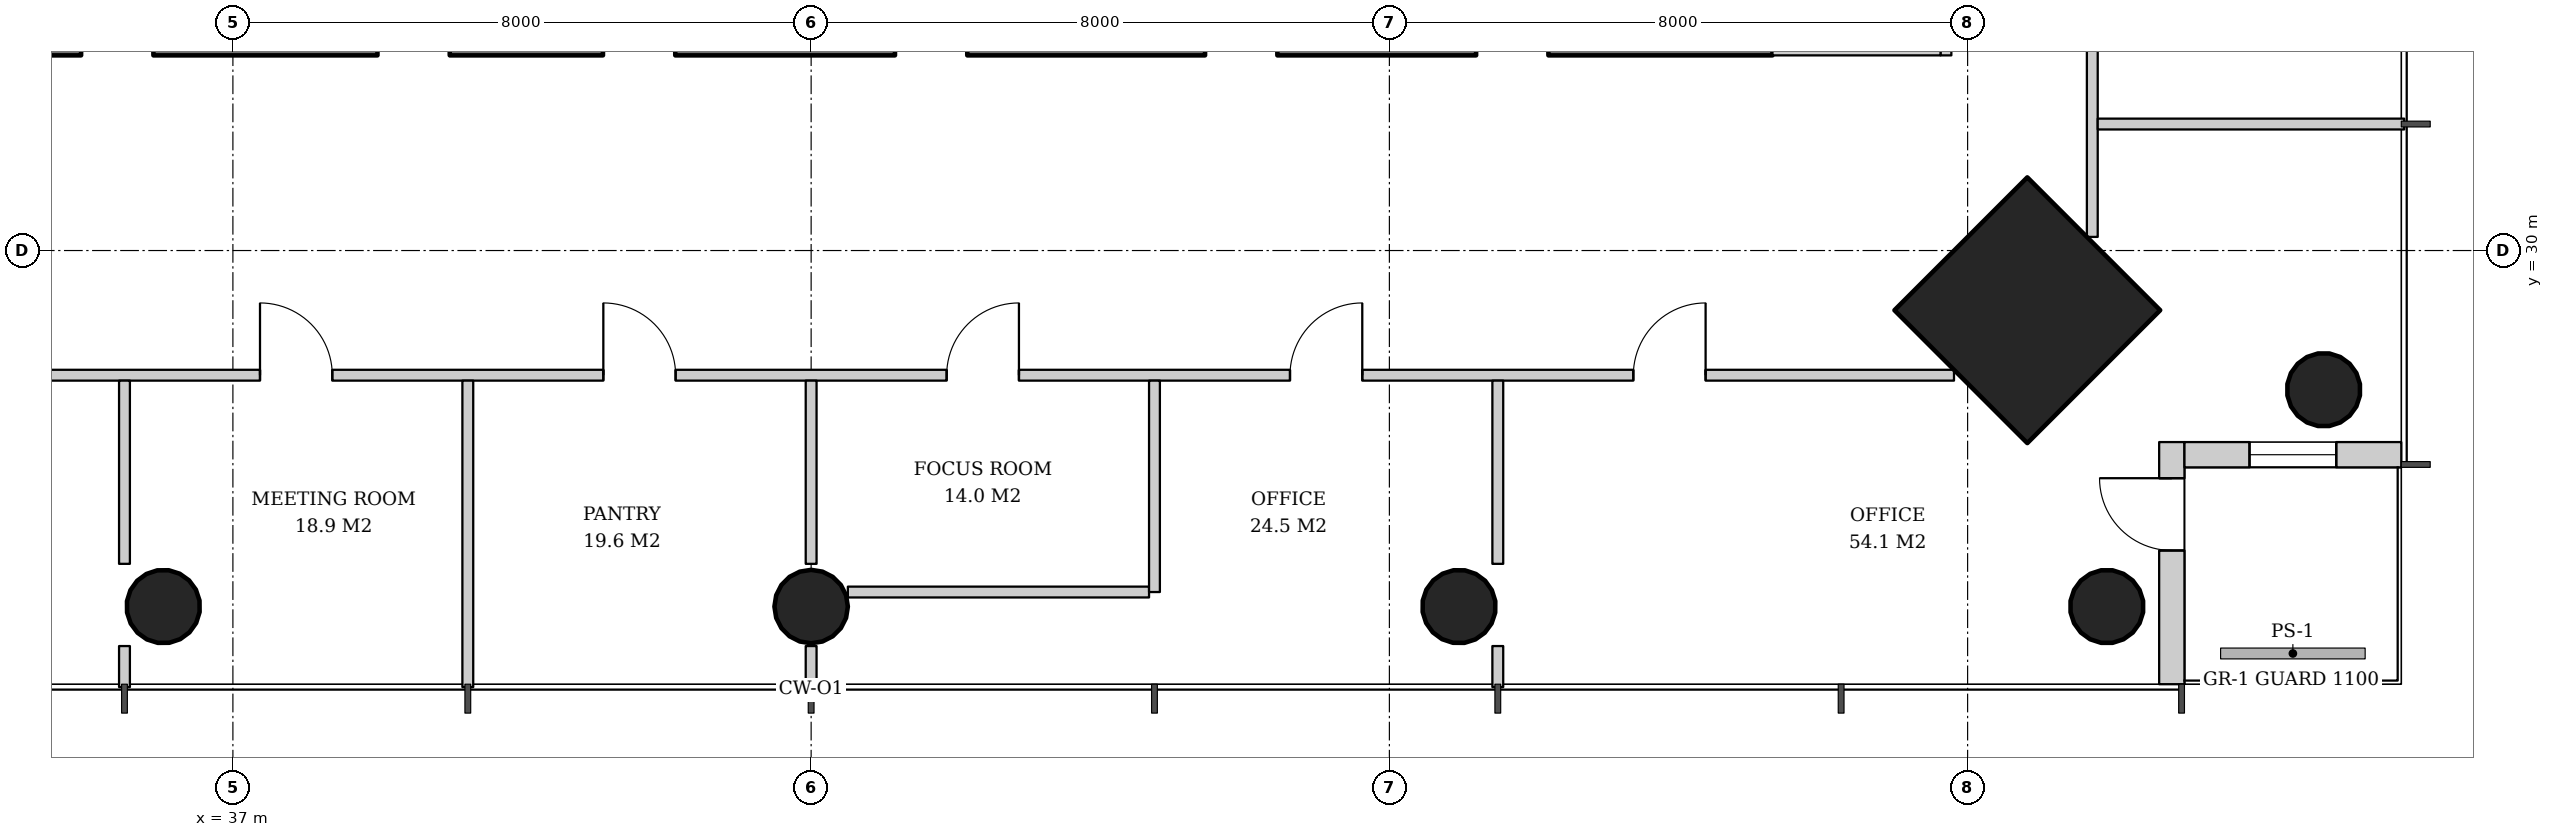
"""IFC4 building model, lengths in metres.
Left out: names, types, materials, properties, quantities, classifications, styles, units other than length and angle.
Written with IfcOpenShell. Run it as: python <this file> out.ifc"""

import sys

from ifc_helpers import new_model, si_unit, direction, frame, frame_2d, origin, origin_2d, place, context, subcontext, project, spatial, rectangle, hollow_circle, extrude, element, fill, save


model = new_model("IFC4")
c1 = context("Model", 3, precision=1e-05, world=origin(), true_north=direction((0.0, 1.0)))
c2 = subcontext(c1, "Body", "Model", "MODEL_VIEW")
j1 = project(units=[si_unit("LENGTHUNIT", "METRE"), si_unit("PLANEANGLEUNIT", "RADIAN")], contexts=[c1])
p1 = place(None, origin())
s1 = spatial("IfcSite", under=j1, at=p1, CompositionType="ELEMENT")
p2 = place(p1, origin())
s2 = spatial("IfcBuilding", under=s1, at=p2, CompositionType="ELEMENT")
p3 = place(p2, frame((0.0, 0.0, 116.0)))
s3 = spatial("IfcBuildingStorey", under=s2, at=p3, CompositionType="ELEMENT", Elevation=116.0)
p4 = place(p3, frame((65.964, 28.036, 0.0), z_axis=(-0.031962158256, 0.031962158256, 0.998977898093), x_axis=(-0.707106781187, -0.707106781187, 0.0)))
e1 = element("IfcColumn", 1, at=p4, inside=s3, PredefinedType="COLUMN", context=c2, shape_type="SweptSolid", body=[
    extrude(hollow_circle(Radius=0.508, WallThickness=0.04, at=origin_2d()), origin(), (0.0, 0.0, 1.0), 3.804),
])
p5 = place(p3, frame((61.864, 29.136, 0.0), z_axis=(-0.031898107953, 0.031898107953, 0.998981992539), x_axis=(-0.707106781187, -0.707106781187, 0.0)))
e2 = element("IfcColumn", 2, at=p5, inside=s3, PredefinedType="COLUMN", context=c2, shape_type="SweptSolid", body=[
    extrude(rectangle(XDim=2.6, YDim=2.6, at=origin_2d()), origin(), (0.0, 0.0, 1.0), 3.804),
])
p6 = place(p3, frame((62.964, 25.036, 0.0), z_axis=(-0.031962158256, 0.031962158256, 0.998977898093), x_axis=(-0.707106781187, -0.707106781187, 0.0)))
e3 = element("IfcColumn", 3, at=p6, inside=s3, PredefinedType="COLUMN", context=c2, shape_type="SweptSolid", body=[
    extrude(hollow_circle(Radius=0.508, WallThickness=0.04, at=origin_2d()), origin(), (0.0, 0.0, 1.0), 3.804),
])
p7 = place(p3, frame((36.018, 25.036, 0.0), z_axis=(0.015987204877, 0.031974409754, 0.999360818924), x_axis=(-0.894427191, 0.4472135955, 0.0)))
e4 = element("IfcColumn", 4, at=p7, inside=s3, PredefinedType="COLUMN", context=c2, shape_type="SweptSolid", body=[
    extrude(hollow_circle(Radius=0.508, WallThickness=0.04, at=origin_2d()), origin(), (0.0, 0.0, 1.0), 3.802),
])
p8 = place(p3, frame((45.0, 25.036, 0.0), z_axis=(0.0, 0.031978496719, 0.999488557087), x_axis=(-1.0, 0.0, 0.0)))
e5 = element("IfcColumn", 5, at=p8, inside=s3, PredefinedType="COLUMN", context=c2, shape_type="SweptSolid", body=[
    extrude(hollow_circle(Radius=0.508, WallThickness=0.04, at=origin_2d()), origin(), (0.0, 0.0, 1.0), 3.802),
])
p9 = place(p3, frame((53.982, 25.036, 0.0), z_axis=(-0.015987204877, 0.031974409754, 0.999360818924), x_axis=(-0.894427191, -0.4472135955, 0.0)))
e6 = element("IfcColumn", 6, at=p9, inside=s3, PredefinedType="COLUMN", context=c2, shape_type="SweptSolid", body=[
    extrude(hollow_circle(Radius=0.508, WallThickness=0.04, at=origin_2d()), origin(), (0.0, 0.0, 1.0), 3.802),
])
p10 = place(p3, frame((31.7, 33.05, 0.0), z_axis=(0.0, 0.0, 1.0), x_axis=(1.0, 0.0, 0.0)))
e7 = element("IfcWall", 7, at=p10, inside=s3, PredefinedType="SHEAR", context=c2, shape_type="SweptSolid", body=[
    extrude(rectangle(XDim=26.6, YDim=0.7, at=frame_2d((13.3, 0.0))), origin(), (0.0, 0.0, 1.0), 3.8),
])
p11 = place(p10, frame((7.3, 0.0, 0.0)))
e8 = element("IfcOpeningElement", 8, at=p11, cuts=e7, PredefinedType="OPENING", context=c2, shape_type="SweptSolid", body=[
    extrude(rectangle(XDim=1.0, YDim=2.1, at=frame_2d((0.5, 1.05))), frame((0.0, 0.36, 0.0), z_axis=(0.0, -1.0, 0.0), x_axis=(1.0, 0.0, 0.0)), (0.0, 0.0, 1.0), 0.72),
])
p12 = place(p10, frame((18.75, 0.0, 0.0)))
e9 = element("IfcOpeningElement", 9, at=p12, cuts=e7, PredefinedType="OPENING", context=c2, shape_type="SweptSolid", body=[
    extrude(rectangle(XDim=1.0, YDim=2.1, at=frame_2d((0.5, 1.05))), frame((0.0, 0.36, 0.0), z_axis=(0.0, -1.0, 0.0), x_axis=(1.0, 0.0, 0.0)), (0.0, 0.0, 1.0), 0.72),
])
p13 = place(p10, frame((3.2, 0.0, 0.0)))
e10 = element("IfcOpeningElement", 10, at=p13, cuts=e7, PredefinedType="OPENING", context=c2, shape_type="SweptSolid", body=[
    extrude(rectangle(XDim=1.0, YDim=2.1, at=frame_2d((0.5, 1.05))), frame((0.0, 0.36, 0.0), z_axis=(0.0, -1.0, 0.0), x_axis=(1.0, 0.0, 0.0)), (0.0, 0.0, 1.0), 0.72),
])
p14 = place(p10, frame((10.42, 0.0, 0.0)))
e11 = element("IfcOpeningElement", 11, at=p14, cuts=e7, PredefinedType="OPENING", context=c2, shape_type="SweptSolid", body=[
    extrude(rectangle(XDim=1.0, YDim=2.1, at=frame_2d((0.5, 1.05))), frame((0.0, 0.36, 0.0), z_axis=(0.0, -1.0, 0.0), x_axis=(1.0, 0.0, 0.0)), (0.0, 0.0, 1.0), 0.72),
])
p15 = place(p10, frame((14.46, 0.0, 0.0)))
e12 = element("IfcOpeningElement", 12, at=p15, cuts=e7, PredefinedType="OPENING", context=c2, shape_type="SweptSolid", body=[
    extrude(rectangle(XDim=1.0, YDim=2.1, at=frame_2d((0.5, 1.05))), frame((0.0, 0.36, 0.0), z_axis=(0.0, -1.0, 0.0), x_axis=(1.0, 0.0, 0.0)), (0.0, 0.0, 1.0), 0.72),
])
p16 = place(p10, frame((22.5, 0.0, 0.0)))
e13 = element("IfcOpeningElement", 13, at=p16, cuts=e7, PredefinedType="OPENING", context=c2, shape_type="SweptSolid", body=[
    extrude(rectangle(XDim=1.0, YDim=2.1, at=frame_2d((0.5, 1.05))), frame((0.0, 0.36, 0.0), z_axis=(0.0, -1.0, 0.0), x_axis=(1.0, 0.0, 0.0)), (0.0, 0.0, 1.0), 0.72),
])
p17 = place(p3, frame((63.825, 24.0, 0.0), z_axis=(0.0, 0.0, 1.0), x_axis=(0.0, 1.0, 0.0)))
e14 = element("IfcWall", 14, at=p17, inside=s3, PredefinedType="SOLIDWALL", context=c2, shape_type="SweptSolid", body=[
    extrude(rectangle(XDim=3.35, YDim=0.35, at=frame_2d((1.675, 0.0))), origin(), (0.0, 0.0, 1.0), 3.62),
])
p18 = place(p17, frame((1.85, 0.0, 0.0)))
e15 = element("IfcOpeningElement", 15, at=p18, cuts=e14, PredefinedType="OPENING", context=c2, shape_type="SweptSolid", body=[
    extrude(rectangle(XDim=1.0, YDim=2.4, at=frame_2d((0.5, 1.2))), frame((0.0, 0.185, 0.0), z_axis=(0.0, -1.0, 0.0), x_axis=(1.0, 0.0, 0.0)), (0.0, 0.0, 1.0), 0.37),
])
p19 = place(p3, frame((64.0, 27.175, 0.0), z_axis=(0.0, 0.0, 1.0), x_axis=(1.0, 0.0, 0.0)))
e16 = element("IfcWall", 16, at=p19, inside=s3, PredefinedType="SOLIDWALL", context=c2, shape_type="SweptSolid", body=[
    extrude(rectangle(XDim=3.0, YDim=0.35, at=frame_2d((1.5, 0.0))), origin(), (0.0, 0.0, 1.0), 3.62),
])
p20 = place(p19, frame((0.9, 0.0, 0.6)))
e17 = element("IfcOpeningElement", 17, at=p20, cuts=e16, PredefinedType="OPENING", context=c2, shape_type="SweptSolid", body=[
    extrude(rectangle(XDim=1.2, YDim=2.55, at=frame_2d((0.6, 1.275))), frame((0.0, 0.185, 0.0), z_axis=(0.0, -1.0, 0.0), x_axis=(1.0, 0.0, 0.0)), (0.0, 0.0, 1.0), 0.37),
])
p21 = place(p3, frame((60.7, 32.7, 0.0), z_axis=(0.0, 0.0, 1.0), x_axis=(0.0, 1.0, 0.0)))
e18 = element("IfcWall", 18, at=p21, inside=s3, PredefinedType="PARTITIONING", context=c2, shape_type="SweptSolid", body=[
    extrude(rectangle(XDim=11.275, YDim=0.15, at=frame_2d((5.638, 0.0))), origin(), (0.0, 0.0, 1.0), 2.72),
])
p22 = place(p21, frame((5.137, 0.0, 0.0)))
e19 = element("IfcOpeningElement", 19, at=p22, cuts=e18, PredefinedType="OPENING", context=c2, shape_type="SweptSolid", body=[
    extrude(rectangle(XDim=1.0, YDim=2.1, at=frame_2d((0.5, 1.05))), frame((0.0, 0.085, 0.0), z_axis=(0.0, -1.0, 0.0), x_axis=(1.0, 0.0, 0.0)), (0.0, 0.0, 1.0), 0.17),
])
p23 = place(p3, frame((58.3, 32.775, 0.0), z_axis=(0.0, 0.0, 1.0), x_axis=(1.0, 0.0, 0.0)))
e20 = element("IfcWall", 20, at=p23, inside=s3, PredefinedType="PARTITIONING", context=c2, shape_type="SweptSolid", body=[
    extrude(rectangle(XDim=2.325, YDim=0.15, at=frame_2d((1.163, 0.0))), origin(), (0.0, 0.0, 1.0), 3.62),
])
p24 = place(p3, frame((62.725, 30.188, 0.0), z_axis=(0.0, 0.0, 1.0), x_axis=(0.0, 1.0, 0.0)))
e21 = element("IfcWall", 21, at=p24, inside=s3, PredefinedType="PARTITIONING", context=c2, shape_type="SweptSolid", body=[
    extrude(rectangle(XDim=31.623, YDim=0.15, at=frame_2d((15.812, 0.0))), origin(), (0.0, 0.0, 1.0), 2.72),
])
p25 = place(p24, frame((3.437, 0.0, 0.0)))
e22 = element("IfcOpeningElement", 22, at=p25, cuts=e21, PredefinedType="OPENING", context=c2, shape_type="SweptSolid", body=[
    extrude(rectangle(XDim=1.0, YDim=2.1, at=frame_2d((0.5, 1.05))), frame((0.0, 0.085, 0.0), z_axis=(0.0, -1.0, 0.0), x_axis=(1.0, 0.0, 0.0)), (0.0, 0.0, 1.0), 0.17),
])
p26 = place(p24, frame((8.187, 0.0, 0.0)))
e23 = element("IfcOpeningElement", 23, at=p26, cuts=e21, PredefinedType="OPENING", context=c2, shape_type="SweptSolid", body=[
    extrude(rectangle(XDim=1.0, YDim=2.1, at=frame_2d((0.5, 1.05))), frame((0.0, 0.085, 0.0), z_axis=(0.0, -1.0, 0.0), x_axis=(1.0, 0.0, 0.0)), (0.0, 0.0, 1.0), 0.17),
])
p27 = place(p24, frame((12.937, 0.0, 0.0)))
e24 = element("IfcOpeningElement", 24, at=p27, cuts=e21, PredefinedType="OPENING", context=c2, shape_type="SweptSolid", body=[
    extrude(rectangle(XDim=1.0, YDim=2.1, at=frame_2d((0.5, 1.05))), frame((0.0, 0.085, 0.0), z_axis=(0.0, -1.0, 0.0), x_axis=(1.0, 0.0, 0.0)), (0.0, 0.0, 1.0), 0.17),
])
p28 = place(p24, frame((17.687, 0.0, 0.0)))
e25 = element("IfcOpeningElement", 25, at=p28, cuts=e21, PredefinedType="OPENING", context=c2, shape_type="SweptSolid", body=[
    extrude(rectangle(XDim=1.0, YDim=2.1, at=frame_2d((0.5, 1.05))), frame((0.0, 0.085, 0.0), z_axis=(0.0, -1.0, 0.0), x_axis=(1.0, 0.0, 0.0)), (0.0, 0.0, 1.0), 0.17),
])
p29 = place(p24, frame((22.437, 0.0, 0.0)))
e26 = element("IfcOpeningElement", 26, at=p29, cuts=e21, PredefinedType="OPENING", context=c2, shape_type="SweptSolid", body=[
    extrude(rectangle(XDim=1.0, YDim=2.1, at=frame_2d((0.5, 1.05))), frame((0.0, 0.085, 0.0), z_axis=(0.0, -1.0, 0.0), x_axis=(1.0, 0.0, 0.0)), (0.0, 0.0, 1.0), 0.17),
])
p30 = place(p24, frame((27.187, 0.0, 0.0)))
e27 = element("IfcOpeningElement", 27, at=p30, cuts=e21, PredefinedType="OPENING", context=c2, shape_type="SweptSolid", body=[
    extrude(rectangle(XDim=1.0, YDim=2.1, at=frame_2d((0.5, 1.05))), frame((0.0, 0.085, 0.0), z_axis=(0.0, -1.0, 0.0), x_axis=(1.0, 0.0, 0.0)), (0.0, 0.0, 1.0), 0.17),
])
p31 = place(p3, frame((62.8, 31.75, 0.0), z_axis=(0.0, 0.0, 1.0), x_axis=(1.0, 0.0, 0.0)))
e28 = element("IfcWall", 28, at=p31, inside=s3, PredefinedType="PARTITIONING", context=c2, shape_type="SweptSolid", body=[
    extrude(rectangle(XDim=4.24, YDim=0.15, at=frame_2d((2.12, 0.0))), origin(), (0.0, 0.0, 1.0), 2.82),
])
p32 = place(p3, frame((45.508, 25.275, 0.0), z_axis=(0.0, 0.0, 1.0), x_axis=(1.0, 0.0, 0.0)))
e29 = element("IfcWall", 29, at=p32, inside=s3, PredefinedType="PARTITIONING", context=c2, shape_type="SweptSolid", body=[
    extrude(rectangle(XDim=4.167, YDim=0.15, at=frame_2d((2.083, 0.0))), origin(), (0.0, 0.0, 1.0), 2.82),
])
p33 = place(p3, frame((29.188, 28.275, 0.0), z_axis=(0.0, 0.0, 1.0), x_axis=(1.0, 0.0, 0.0)))
e30 = element("IfcWall", 30, at=p33, inside=s3, PredefinedType="PARTITIONING", context=c2, shape_type="SweptSolid", body=[
    extrude(rectangle(XDim=31.623, YDim=0.15, at=frame_2d((15.812, 0.0))), origin(), (0.0, 0.0, 1.0), 2.72),
])
p34 = place(p33, frame((3.437, 0.0, 0.0)))
e31 = element("IfcOpeningElement", 31, at=p34, cuts=e30, PredefinedType="OPENING", context=c2, shape_type="SweptSolid", body=[
    extrude(rectangle(XDim=1.0, YDim=2.1, at=frame_2d((0.5, 1.05))), frame((0.0, 0.085, 0.0), z_axis=(0.0, -1.0, 0.0), x_axis=(1.0, 0.0, 0.0)), (0.0, 0.0, 1.0), 0.17),
])
p35 = place(p33, frame((8.187, 0.0, 0.0)))
e32 = element("IfcOpeningElement", 32, at=p35, cuts=e30, PredefinedType="OPENING", context=c2, shape_type="SweptSolid", body=[
    extrude(rectangle(XDim=1.0, YDim=2.1, at=frame_2d((0.5, 1.05))), frame((0.0, 0.085, 0.0), z_axis=(0.0, -1.0, 0.0), x_axis=(1.0, 0.0, 0.0)), (0.0, 0.0, 1.0), 0.17),
])
p36 = place(p33, frame((12.937, 0.0, 0.0)))
e33 = element("IfcOpeningElement", 33, at=p36, cuts=e30, PredefinedType="OPENING", context=c2, shape_type="SweptSolid", body=[
    extrude(rectangle(XDim=1.0, YDim=2.1, at=frame_2d((0.5, 1.05))), frame((0.0, 0.085, 0.0), z_axis=(0.0, -1.0, 0.0), x_axis=(1.0, 0.0, 0.0)), (0.0, 0.0, 1.0), 0.17),
])
p37 = place(p33, frame((17.687, 0.0, 0.0)))
e34 = element("IfcOpeningElement", 34, at=p37, cuts=e30, PredefinedType="OPENING", context=c2, shape_type="SweptSolid", body=[
    extrude(rectangle(XDim=1.0, YDim=2.1, at=frame_2d((0.5, 1.05))), frame((0.0, 0.085, 0.0), z_axis=(0.0, -1.0, 0.0), x_axis=(1.0, 0.0, 0.0)), (0.0, 0.0, 1.0), 0.17),
])
p38 = place(p33, frame((22.437, 0.0, 0.0)))
e35 = element("IfcOpeningElement", 35, at=p38, cuts=e30, PredefinedType="OPENING", context=c2, shape_type="SweptSolid", body=[
    extrude(rectangle(XDim=1.0, YDim=2.1, at=frame_2d((0.5, 1.05))), frame((0.0, 0.085, 0.0), z_axis=(0.0, -1.0, 0.0), x_axis=(1.0, 0.0, 0.0)), (0.0, 0.0, 1.0), 0.17),
])
p39 = place(p33, frame((27.187, 0.0, 0.0)))
e36 = element("IfcOpeningElement", 36, at=p39, cuts=e30, PredefinedType="OPENING", context=c2, shape_type="SweptSolid", body=[
    extrude(rectangle(XDim=1.0, YDim=2.1, at=frame_2d((0.5, 1.05))), frame((0.0, 0.085, 0.0), z_axis=(0.0, -1.0, 0.0), x_axis=(1.0, 0.0, 0.0)), (0.0, 0.0, 1.0), 0.17),
])
p40 = place(p3, frame((35.5, 28.2, 0.0), z_axis=(0.0, 0.0, 1.0), x_axis=(0.0, -1.0, 0.0)))
e37 = element("IfcWall", 37, at=p40, inside=s3, PredefinedType="PARTITIONING", context=c2, shape_type="SweptSolid", body=[
    extrude(rectangle(XDim=2.535, YDim=0.15, at=frame_2d((1.268, 0.0))), origin(), (0.0, 0.0, 1.0), 3.62),
])
p41 = place(p3, frame((35.5, 24.528, 0.0), z_axis=(0.0, 0.0, 1.0), x_axis=(0.0, -1.0, 0.0)))
e38 = element("IfcWall", 38, at=p41, inside=s3, PredefinedType="PARTITIONING", context=c2, shape_type="SweptSolid", body=[
    extrude(rectangle(XDim=0.568, YDim=0.15, at=frame_2d((0.284, 0.0))), origin(), (0.0, 0.0, 1.0), 3.62),
])
p42 = place(p3, frame((40.25, 28.2, 0.0), z_axis=(0.0, 0.0, 1.0), x_axis=(0.0, -1.0, 0.0)))
e39 = element("IfcWall", 39, at=p42, inside=s3, PredefinedType="PARTITIONING", context=c2, shape_type="SweptSolid", body=[
    extrude(rectangle(XDim=4.24, YDim=0.15, at=frame_2d((2.12, 0.0))), origin(), (0.0, 0.0, 1.0), 2.82),
])
p43 = place(p3, frame((45.0, 28.2, 0.0), z_axis=(0.0, 0.0, 1.0), x_axis=(0.0, -1.0, 0.0)))
e40 = element("IfcWall", 40, at=p43, inside=s3, PredefinedType="PARTITIONING", context=c2, shape_type="SweptSolid", body=[
    extrude(rectangle(XDim=2.535, YDim=0.15, at=frame_2d((1.268, 0.0))), origin(), (0.0, 0.0, 1.0), 3.62),
])
p44 = place(p3, frame((45.0, 24.528, 0.0), z_axis=(0.0, 0.0, 1.0), x_axis=(0.0, -1.0, 0.0)))
e41 = element("IfcWall", 41, at=p44, inside=s3, PredefinedType="PARTITIONING", context=c2, shape_type="SweptSolid", body=[
    extrude(rectangle(XDim=0.568, YDim=0.15, at=frame_2d((0.284, 0.0))), origin(), (0.0, 0.0, 1.0), 3.62),
])
p45 = place(p3, frame((49.75, 28.2, 0.0), z_axis=(0.0, 0.0, 1.0), x_axis=(0.0, -1.0, 0.0)))
e42 = element("IfcWall", 42, at=p45, inside=s3, PredefinedType="PARTITIONING", context=c2, shape_type="SweptSolid", body=[
    extrude(rectangle(XDim=2.925, YDim=0.15, at=frame_2d((1.462, 0.0))), origin(), (0.0, 0.0, 1.0), 2.82),
])
p46 = place(p3, frame((54.5, 28.2, 0.0), z_axis=(0.0, 0.0, 1.0), x_axis=(0.0, -1.0, 0.0)))
e43 = element("IfcWall", 43, at=p46, inside=s3, PredefinedType="PARTITIONING", context=c2, shape_type="SweptSolid", body=[
    extrude(rectangle(XDim=2.535, YDim=0.15, at=frame_2d((1.268, 0.0))), origin(), (0.0, 0.0, 1.0), 3.62),
])
p47 = place(p3, frame((54.5, 24.528, 0.0), z_axis=(0.0, 0.0, 1.0), x_axis=(0.0, -1.0, 0.0)))
e44 = element("IfcWall", 44, at=p47, inside=s3, PredefinedType="PARTITIONING", context=c2, shape_type="SweptSolid", body=[
    extrude(rectangle(XDim=0.568, YDim=0.15, at=frame_2d((0.284, 0.0))), origin(), (0.0, 0.0, 1.0), 3.62),
])
p48 = place(p18, origin())
e45 = element("IfcDoor", 45, at=p48, inside=s3, OperationType="SINGLE_SWING_RIGHT", PredefinedType="DOOR", context=c2, shape_type="SweptSolid", body=[
    extrude(rectangle(XDim=1.0, YDim=2.4, at=frame_2d((0.5, 1.2))), frame((0.0, 0.025, 0.0), z_axis=(0.0, -1.0, 0.0), x_axis=(1.0, 0.0, 0.0)), (0.0, 0.0, 1.0), 0.05),
])
fill(e15, e45)
p49 = place(p20, origin())
e46 = element("IfcWindow", 46, at=p49, inside=s3, PartitioningType="SINGLE_PANEL", PredefinedType="WINDOW", context=c2, shape_type="SweptSolid", body=[
    extrude(rectangle(XDim=1.2, YDim=2.55, at=frame_2d((0.6, 1.275))), frame((0.0, 0.03, 0.0), z_axis=(0.0, -1.0, 0.0), x_axis=(1.0, 0.0, 0.0)), (0.0, 0.0, 1.0), 0.06),
])
fill(e17, e46)
p50 = place(p35, origin())
e47 = element("IfcDoor", 47, at=p50, inside=s3, OperationType="SINGLE_SWING_LEFT", PredefinedType="DOOR", context=c2, shape_type="SweptSolid", body=[
    extrude(rectangle(XDim=1.0, YDim=2.1, at=frame_2d((0.5, 1.05))), frame((0.0, 0.025, 0.0), z_axis=(0.0, -1.0, 0.0), x_axis=(1.0, 0.0, 0.0)), (0.0, 0.0, 1.0), 0.05),
])
fill(e32, e47)
p51 = place(p36, origin())
e48 = element("IfcDoor", 48, at=p51, inside=s3, OperationType="SINGLE_SWING_LEFT", PredefinedType="DOOR", context=c2, shape_type="SweptSolid", body=[
    extrude(rectangle(XDim=1.0, YDim=2.1, at=frame_2d((0.5, 1.05))), frame((0.0, 0.025, 0.0), z_axis=(0.0, -1.0, 0.0), x_axis=(1.0, 0.0, 0.0)), (0.0, 0.0, 1.0), 0.05),
])
fill(e33, e48)
p52 = place(p37, origin())
e49 = element("IfcDoor", 49, at=p52, inside=s3, OperationType="SINGLE_SWING_RIGHT", PredefinedType="DOOR", context=c2, shape_type="SweptSolid", body=[
    extrude(rectangle(XDim=1.0, YDim=2.1, at=frame_2d((0.5, 1.05))), frame((0.0, 0.025, 0.0), z_axis=(0.0, -1.0, 0.0), x_axis=(1.0, 0.0, 0.0)), (0.0, 0.0, 1.0), 0.05),
])
fill(e34, e49)
p53 = place(p38, origin())
e50 = element("IfcDoor", 50, at=p53, inside=s3, OperationType="SINGLE_SWING_RIGHT", PredefinedType="DOOR", context=c2, shape_type="SweptSolid", body=[
    extrude(rectangle(XDim=1.0, YDim=2.1, at=frame_2d((0.5, 1.05))), frame((0.0, 0.025, 0.0), z_axis=(0.0, -1.0, 0.0), x_axis=(1.0, 0.0, 0.0)), (0.0, 0.0, 1.0), 0.05),
])
fill(e35, e50)
p54 = place(p39, origin())
e51 = element("IfcDoor", 51, at=p54, inside=s3, OperationType="SINGLE_SWING_RIGHT", PredefinedType="DOOR", context=c2, shape_type="SweptSolid", body=[
    extrude(rectangle(XDim=1.0, YDim=2.1, at=frame_2d((0.5, 1.05))), frame((0.0, 0.025, 0.0), z_axis=(0.0, -1.0, 0.0), x_axis=(1.0, 0.0, 0.0)), (0.0, 0.0, 1.0), 0.05),
])
fill(e36, e51)
save(model, sys.argv[1])
